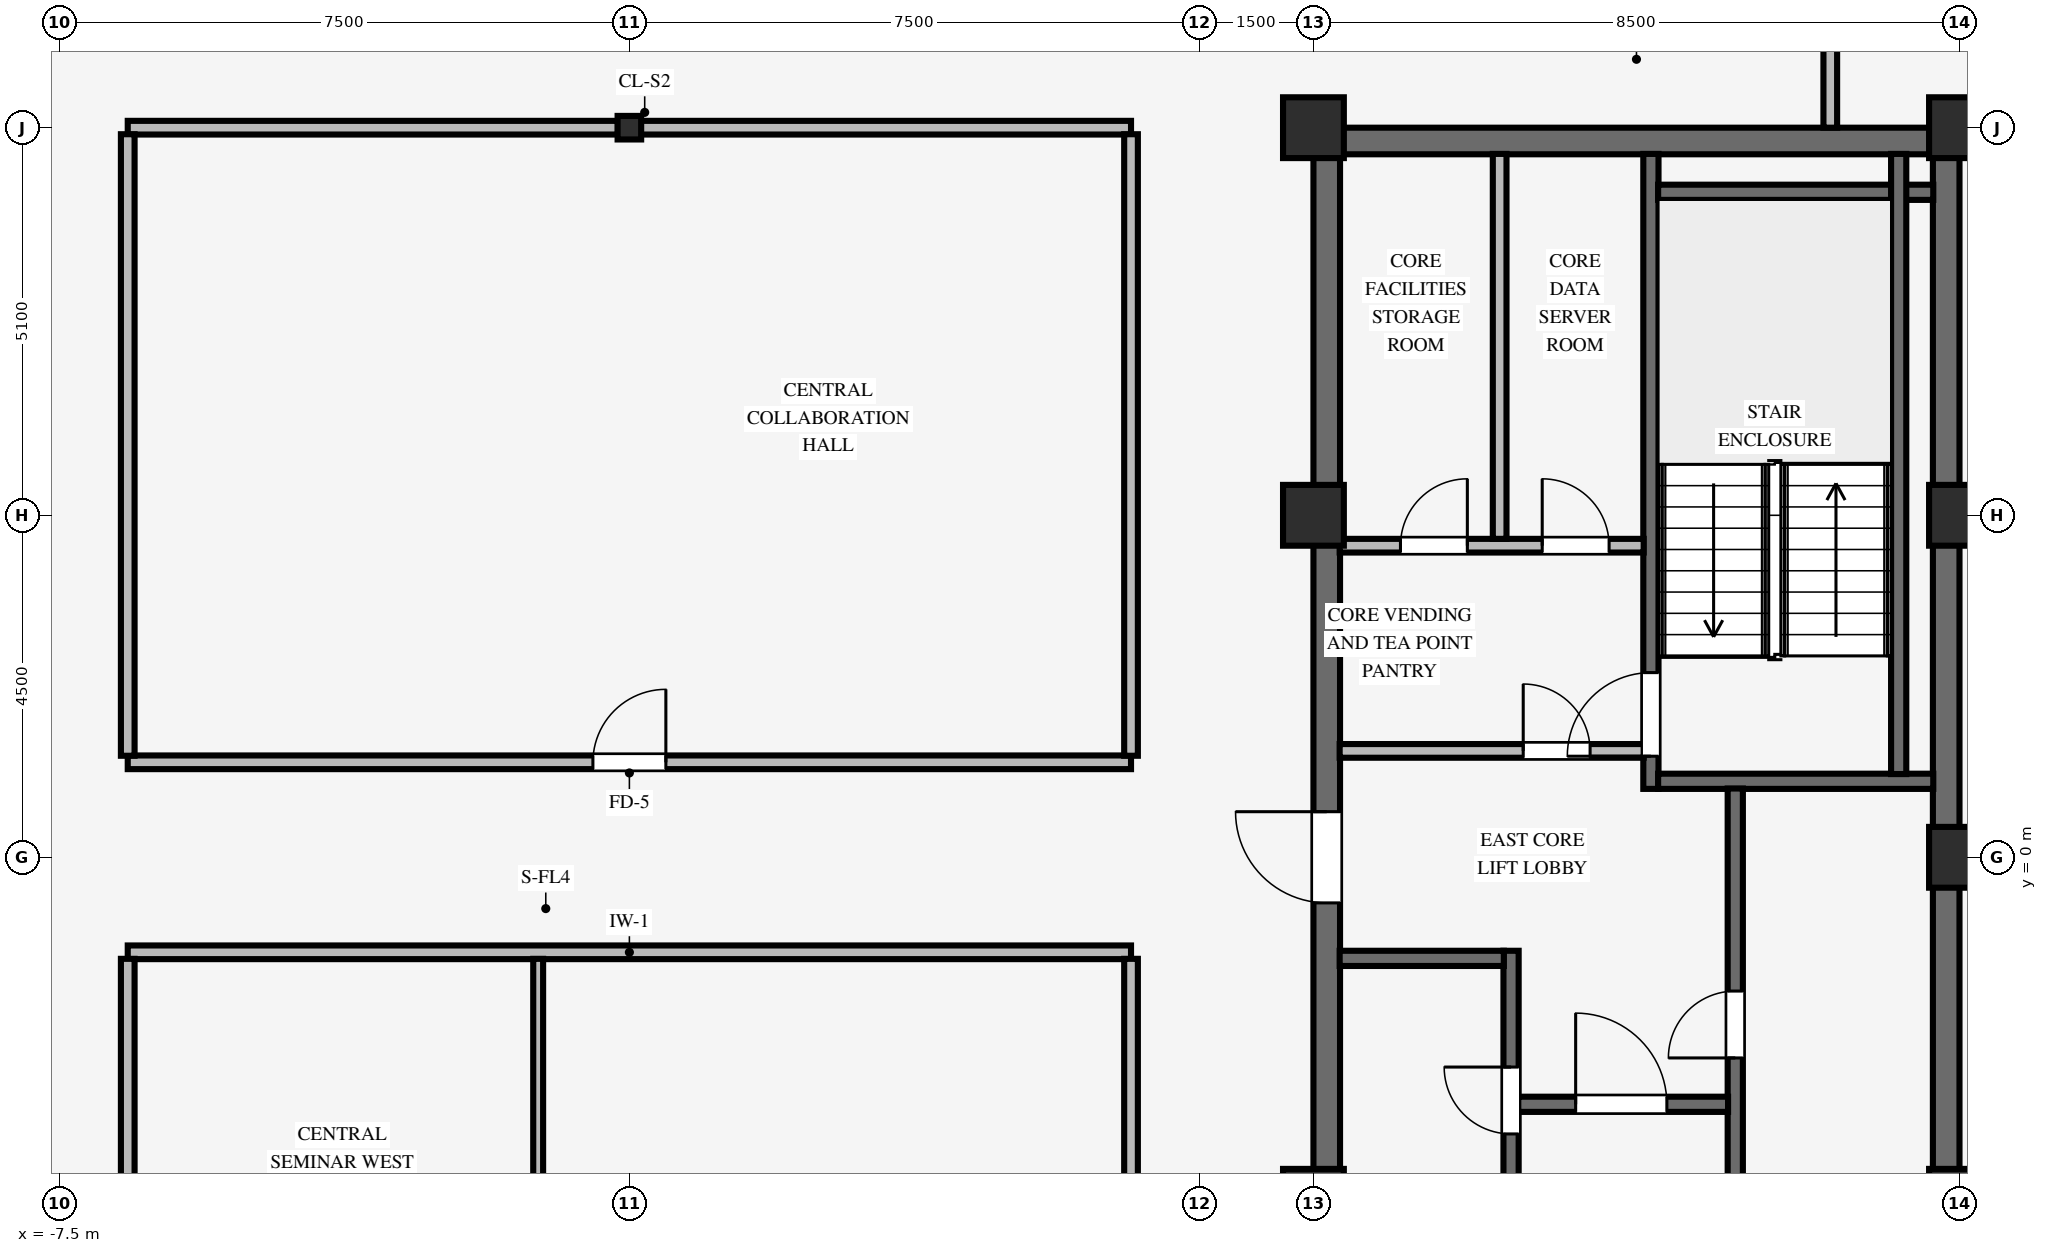
"""IFC4 building model, lengths in metres.
Left out: names, types, materials, properties, quantities, classifications, styles, units other than length and angle.
Written with IfcOpenShell. Run it as: python <this file> out.ifc"""

import sys

from ifc_helpers import new_model, si_unit, direction, frame, frame_2d, origin, origin_2d, place, context, subcontext, project, spatial, rectangle, i_section, extrude, source, transform, mapped, element, fill, save


model = new_model("IFC4")
c1 = context("Model", 3, precision=1e-05, world=origin(), true_north=direction((0.0, 1.0)))
c2 = subcontext(c1, "Body", "Model", "MODEL_VIEW")
j1 = project(units=[si_unit("LENGTHUNIT", "METRE"), si_unit("PLANEANGLEUNIT", "RADIAN")], contexts=[c1])
p1 = place(None, origin())
s1 = spatial("IfcSite", under=j1, at=p1, CompositionType="ELEMENT")
p2 = place(p1, origin())
s2 = spatial("IfcBuilding", under=s1, at=p2, CompositionType="ELEMENT")
p3 = place(p2, frame((0.0, 0.0, 257.95)))
s3 = spatial("IfcBuildingStorey", under=s2, at=p3, CompositionType="ELEMENT", Elevation=257.95)
p4 = place(p3, frame((9.0, 9.425, 0.0), z_axis=(0.0, 0.0, 1.0), x_axis=(1.0, 0.0, 0.0)))
e1 = element("IfcWall", 1, at=p4, inside=s3, PredefinedType="SHEAR", context=c2, shape_type="SweptSolid", body=[
    extrude(rectangle(XDim=8.5, YDim=0.35, at=frame_2d((4.25, 0.0))), origin(), (0.0, 0.0, 1.0), 3.37),
])
p5 = place(p3, frame((9.175, -9.255, 0.0), z_axis=(0.0, 0.0, 1.0), x_axis=(0.0, 1.0, 0.0)))
e2 = element("IfcWall", 2, at=p5, inside=s3, PredefinedType="SHEAR", context=c2, shape_type="SweptSolid", body=[
    extrude(rectangle(XDim=18.51, YDim=0.35, at=frame_2d((9.255, 0.0))), origin(), (0.0, 0.0, 1.0), 3.37),
])
p6 = place(p5, frame((8.655, 0.0, 0.0)))
e3 = element("IfcOpeningElement", 3, at=p6, cuts=e2, PredefinedType="OPENING", context=c2, shape_type="SweptSolid", body=[
    extrude(rectangle(XDim=1.2, YDim=2.15, at=frame_2d((0.6, 1.075))), frame((0.0, 0.185, 0.0), z_axis=(0.0, -1.0, 0.0), x_axis=(1.0, 0.0, 0.0)), (0.0, 0.0, 1.0), 0.37),
])
p7 = place(p3, frame((17.325, -9.255, 0.0), z_axis=(0.0, 0.0, 1.0), x_axis=(0.0, 1.0, 0.0)))
e4 = element("IfcWall", 4, at=p7, inside=s3, PredefinedType="SHEAR", context=c2, shape_type="SweptSolid", body=[
    extrude(rectangle(XDim=18.51, YDim=0.35, at=frame_2d((9.255, 0.0))), origin(), (0.0, 0.0, 1.0), 3.37),
])
for number, where, z_axis, x_axis in (
    (5, (9.0, -4.5, 0.0), (0.0, 0.0, 1.0), (1.0, 0.0, 0.0)),
    (6, (9.0, 4.5, 0.0), (0.0, 0.0, 1.0), (1.0, 0.0, 0.0)),
    (7, (9.0, 9.6, 0.0), (0.0, 0.0, 1.0), (1.0, 0.0, 0.0)),
    (8, (17.5, -4.5, 0.0), (0.0, 0.0, 1.0), (1.0, 0.0, 0.0)),
    (9, (17.5, 4.5, 0.0), (0.0, 0.0, 1.0), (1.0, 0.0, 0.0)),
    (10, (17.5, 9.6, 0.0), (0.0, 0.0, 1.0), (1.0, 0.0, 0.0)),
    (11, (17.5, 0.0, 0.0), (0.0, 0.0, 1.0), (1.0, 0.0, 0.0)),
):
    element("IfcColumn", number, at=place(p3, frame(where, z_axis=z_axis, x_axis=x_axis)), inside=s3, PredefinedType="COLUMN", context=c2, shape_type="SweptSolid", body=[
        extrude(rectangle(XDim=0.8, YDim=0.8, at=origin_2d()), origin(), (0.0, 0.0, 1.0), 3.37),
    ])
p8 = place(p3, frame((0.0, 9.6, 0.0), z_axis=(0.0, 0.0, 1.0), x_axis=(1.0, 0.0, 0.0)))
e12 = element("IfcColumn", 12, at=p8, inside=s3, PredefinedType="COLUMN", context=c2, shape_type="SweptSolid", body=[
    extrude(i_section(OverallWidth=0.31, OverallDepth=0.31, WebThickness=0.015, FlangeThickness=0.015, FilletRadius=0.015, at=origin_2d()), origin(), (0.0, 0.0, 1.0), 3.37),
])
p9 = place(p3, frame((13.44, 0.9, 0.0), z_axis=(0.0, 0.0, 1.0), x_axis=(0.0, 1.0, 0.0)))
e13 = element("IfcWall", 13, at=p9, inside=s3, PredefinedType="SHEAR", context=c2, shape_type="SweptSolid", body=[
    extrude(rectangle(XDim=8.355, YDim=0.2, at=frame_2d((4.177, 0.0))), origin(), (0.0, 0.0, 1.0), 3.37),
])
p10 = place(p9, frame((0.43, 0.0, 0.0)))
e14 = element("IfcOpeningElement", 14, at=p10, cuts=e13, PredefinedType="OPENING", context=c2, shape_type="SweptSolid", body=[
    extrude(rectangle(XDim=1.1, YDim=2.15, at=frame_2d((0.55, 1.075))), frame((0.0, 0.11, 0.0), z_axis=(0.0, -1.0, 0.0), x_axis=(1.0, 0.0, 0.0)), (0.0, 0.0, 1.0), 0.22),
])
for number, where, z_axis, x_axis in (
    (15, (13.535, 1.0, 0.0), (0.0, 0.0, 1.0), (1.0, 0.0, 0.0)),
    (16, (13.535, 8.75, 0.0), (0.0, 0.0, 1.0), (1.0, 0.0, 0.0)),
):
    element("IfcWall", number, at=place(p3, frame(where, z_axis=z_axis, x_axis=x_axis)), inside=s3, PredefinedType="SHEAR", context=c2, shape_type="SweptSolid", body=[
        extrude(rectangle(XDim=3.62, YDim=0.2, at=frame_2d((1.81, 0.0))), origin(), (0.0, 0.0, 1.0), 3.37),
    ])
p11 = place(p3, frame((16.7, 1.095, 0.0), z_axis=(0.0, 0.0, 1.0), x_axis=(0.0, 1.0, 0.0)))
e17 = element("IfcWall", 17, at=p11, inside=s3, PredefinedType="SHEAR", context=c2, shape_type="SweptSolid", body=[
    extrude(rectangle(XDim=8.16, YDim=0.2, at=frame_2d((4.08, 0.0))), origin(), (0.0, 0.0, 1.0), 3.37),
])
p12 = place(p3, frame((14.55, -9.255, 0.0), z_axis=(0.0, 0.0, 1.0), x_axis=(0.0, 1.0, 0.0)))
e18 = element("IfcWall", 18, at=p12, inside=s3, PredefinedType="SHEAR", context=c2, shape_type="SweptSolid", body=[
    extrude(rectangle(XDim=10.16, YDim=0.2, at=frame_2d((5.08, 0.0))), origin(), (0.0, 0.0, 1.0), 3.37),
])
p13 = place(p12, frame((6.615, 0.0, 0.0)))
e19 = element("IfcOpeningElement", 19, at=p13, cuts=e18, PredefinedType="OPENING", context=c2, shape_type="SweptSolid", body=[
    extrude(rectangle(XDim=0.88, YDim=2.1, at=frame_2d((0.44, 1.05))), frame((0.0, 0.11, 0.0), z_axis=(0.0, -1.0, 0.0), x_axis=(1.0, 0.0, 0.0)), (0.0, 0.0, 1.0), 0.22),
])
p14 = place(p12, frame((0.98, 0.0, 0.0)))
e20 = element("IfcOpeningElement", 20, at=p14, cuts=e18, PredefinedType="OPENING", context=c2, shape_type="SweptSolid", body=[
    extrude(rectangle(XDim=1.15, YDim=2.15, at=frame_2d((0.575, 1.075))), frame((0.0, 0.11, 0.0), z_axis=(0.0, -1.0, 0.0), x_axis=(1.0, 0.0, 0.0)), (0.0, 0.0, 1.0), 0.22),
])
p15 = place(p3, frame((11.6, -9.255, 0.0), z_axis=(0.0, 0.0, 1.0), x_axis=(0.0, 1.0, 0.0)))
e21 = element("IfcWall", 21, at=p15, inside=s3, PredefinedType="SHEAR", context=c2, shape_type="SweptSolid", body=[
    extrude(rectangle(XDim=8.025, YDim=0.2, at=frame_2d((4.012, 0.0))), origin(), (0.0, 0.0, 1.0), 3.37),
])
p16 = place(p15, frame((5.615, 0.0, 0.0)))
e22 = element("IfcOpeningElement", 22, at=p16, cuts=e21, PredefinedType="OPENING", context=c2, shape_type="SweptSolid", body=[
    extrude(rectangle(XDim=0.88, YDim=2.1, at=frame_2d((0.44, 1.05))), frame((0.0, 0.11, 0.0), z_axis=(0.0, -1.0, 0.0), x_axis=(1.0, 0.0, 0.0)), (0.0, 0.0, 1.0), 0.22),
])
p17 = place(p3, frame((11.695, -3.25, 0.0), z_axis=(0.0, 0.0, 1.0), x_axis=(1.0, 0.0, 0.0)))
e23 = element("IfcWall", 23, at=p17, inside=s3, PredefinedType="SHEAR", context=c2, shape_type="SweptSolid", body=[
    extrude(rectangle(XDim=2.76, YDim=0.2, at=frame_2d((1.38, 0.0))), origin(), (0.0, 0.0, 1.0), 3.37),
])
p18 = place(p17, frame((0.755, 0.0, 0.0)))
e24 = element("IfcOpeningElement", 24, at=p18, cuts=e23, PredefinedType="OPENING", context=c2, shape_type="SweptSolid", body=[
    extrude(rectangle(XDim=1.2, YDim=2.15, at=frame_2d((0.6, 1.075))), frame((0.0, 0.11, 0.0), z_axis=(0.0, -1.0, 0.0), x_axis=(1.0, 0.0, 0.0)), (0.0, 0.0, 1.0), 0.22),
])
p19 = place(p3, frame((9.345, -1.33, 0.0), z_axis=(0.0, 0.0, 1.0), x_axis=(1.0, 0.0, 0.0)))
e25 = element("IfcWall", 25, at=p19, inside=s3, PredefinedType="SHEAR", context=c2, shape_type="SweptSolid", body=[
    extrude(rectangle(XDim=2.16, YDim=0.2, at=frame_2d((1.08, 0.0))), origin(), (0.0, 0.0, 1.0), 3.37),
])
p20 = place(p3, frame((9.345, 1.4, 0.0), z_axis=(0.0, 0.0, 1.0), x_axis=(1.0, 0.0, 0.0)))
e26 = element("IfcWall", 26, at=p20, inside=s3, PredefinedType="PARTITIONING", context=c2, shape_type="SweptSolid", body=[
    extrude(rectangle(XDim=4.0, YDim=0.18, at=frame_2d((2.0, 0.0))), origin(), (0.0, 0.0, 1.0), 3.36),
])
p21 = place(p20, frame((2.415, 0.0, 0.0)))
e27 = element("IfcOpeningElement", 27, at=p21, cuts=e26, PredefinedType="OPENING", context=c2, shape_type="SweptSolid", body=[
    extrude(rectangle(XDim=0.88, YDim=2.1, at=frame_2d((0.44, 1.05))), frame((0.0, 0.1, 0.0), z_axis=(0.0, -1.0, 0.0), x_axis=(1.0, 0.0, 0.0)), (0.0, 0.0, 1.0), 0.2),
])
p22 = place(p3, frame((9.345, 4.1, 0.0), z_axis=(0.0, 0.0, 1.0), x_axis=(1.0, 0.0, 0.0)))
e28 = element("IfcWall", 28, at=p22, inside=s3, PredefinedType="PARTITIONING", context=c2, shape_type="SweptSolid", body=[
    extrude(rectangle(XDim=4.0, YDim=0.18, at=frame_2d((2.0, 0.0))), origin(), (0.0, 0.0, 1.0), 3.36),
])
p23 = place(p22, frame((0.8, 0.0, 0.0)))
e29 = element("IfcOpeningElement", 29, at=p23, cuts=e28, PredefinedType="OPENING", context=c2, shape_type="SweptSolid", body=[
    extrude(rectangle(XDim=0.88, YDim=2.1, at=frame_2d((0.44, 1.05))), frame((0.0, 0.1, 0.0), z_axis=(0.0, -1.0, 0.0), x_axis=(1.0, 0.0, 0.0)), (0.0, 0.0, 1.0), 0.2),
])
p24 = place(p22, frame((2.665, 0.0, 0.0)))
e30 = element("IfcOpeningElement", 30, at=p24, cuts=e28, PredefinedType="OPENING", context=c2, shape_type="SweptSolid", body=[
    extrude(rectangle(XDim=0.88, YDim=2.1, at=frame_2d((0.44, 1.05))), frame((0.0, 0.1, 0.0), z_axis=(0.0, -1.0, 0.0), x_axis=(1.0, 0.0, 0.0)), (0.0, 0.0, 1.0), 0.2),
])
p25 = place(p3, frame((11.45, 4.19, 0.0), z_axis=(0.0, 0.0, 1.0), x_axis=(0.0, 1.0, 0.0)))
e31 = element("IfcWall", 31, at=p25, inside=s3, PredefinedType="PARTITIONING", context=c2, shape_type="SweptSolid", body=[
    extrude(rectangle(XDim=5.065, YDim=0.18, at=frame_2d((2.532, 0.0))), origin(), (0.0, 0.0, 1.0), 3.36),
])
p26 = place(p3, frame((-6.6, -1.25, 0.0), z_axis=(0.0, 0.0, 1.0), x_axis=(1.0, 0.0, 0.0)))
e32 = element("IfcWall", 32, at=p26, inside=s3, PredefinedType="PARTITIONING", context=c2, shape_type="SweptSolid", body=[
    extrude(rectangle(XDim=13.2, YDim=0.18, at=frame_2d((6.6, 0.0))), origin(), (0.0, 0.0, 1.0), 3.36),
])
p27 = place(p3, frame((-6.6, 1.25, 0.0), z_axis=(0.0, 0.0, 1.0), x_axis=(1.0, 0.0, 0.0)))
e33 = element("IfcWall", 33, at=p27, inside=s3, PredefinedType="PARTITIONING", context=c2, shape_type="SweptSolid", body=[
    extrude(rectangle(XDim=13.2, YDim=0.18, at=frame_2d((6.6, 0.0))), origin(), (0.0, 0.0, 1.0), 3.36),
])
p28 = place(p27, frame((6.12, 0.0, 0.0)))
e34 = element("IfcOpeningElement", 34, at=p28, cuts=e33, PredefinedType="OPENING", context=c2, shape_type="SweptSolid", body=[
    extrude(rectangle(XDim=0.96, YDim=2.1, at=frame_2d((0.48, 1.05))), frame((0.0, 0.1, 0.0), z_axis=(0.0, -1.0, 0.0), x_axis=(1.0, 0.0, 0.0)), (0.0, 0.0, 1.0), 0.2),
])
for number, where, z_axis, x_axis in (
    (35, (-6.6, 9.6, 0.0), (0.0, 0.0, 1.0), (1.0, 0.0, 0.0)),
    (36, (0.151, 9.6, 0.0), (0.0, 0.0, 1.0), (1.0, 0.0, 0.0)),
):
    element("IfcWall", number, at=place(p3, frame(where, z_axis=z_axis, x_axis=x_axis)), inside=s3, PredefinedType="PARTITIONING", context=c2, shape_type="SweptSolid", body=[
        extrude(rectangle(XDim=6.449, YDim=0.18, at=frame_2d((3.225, 0.0))), origin(), (0.0, 0.0, 1.0), 2.405),
    ])
p29 = place(p3, frame((-6.6, -19.1, 0.0), z_axis=(0.0, 0.0, 1.0), x_axis=(0.0, 1.0, 0.0)))
e37 = element("IfcWall", 37, at=p29, inside=s3, PredefinedType="PARTITIONING", context=c2, shape_type="SweptSolid", body=[
    extrude(rectangle(XDim=17.764, YDim=0.18, at=frame_2d((8.882, 0.0))), origin(), (0.0, 0.0, 1.0), 3.36),
])
p30 = place(p29, frame((13.152, 0.0, 0.0)))
e38 = element("IfcOpeningElement", 38, at=p30, cuts=e37, PredefinedType="OPENING", context=c2, shape_type="SweptSolid", body=[
    extrude(rectangle(XDim=0.96, YDim=2.1, at=frame_2d((0.48, 1.05))), frame((0.0, 0.1, 0.0), z_axis=(0.0, -1.0, 0.0), x_axis=(1.0, 0.0, 0.0)), (0.0, 0.0, 1.0), 0.2),
])
p31 = place(p29, frame((4.82, 0.0, 0.0)))
e39 = element("IfcOpeningElement", 39, at=p31, cuts=e37, PredefinedType="OPENING", context=c2, shape_type="SweptSolid", body=[
    extrude(rectangle(XDim=0.96, YDim=2.1, at=frame_2d((0.48, 1.05))), frame((0.0, 0.1, 0.0), z_axis=(0.0, -1.0, 0.0), x_axis=(1.0, 0.0, 0.0)), (0.0, 0.0, 1.0), 0.2),
])
p32 = place(p3, frame((-6.6, 1.336, 0.0), z_axis=(0.0, 0.0, 1.0), x_axis=(0.0, 1.0, 0.0)))
e40 = element("IfcWall", 40, at=p32, inside=s3, PredefinedType="PARTITIONING", context=c2, shape_type="SweptSolid", body=[
    extrude(rectangle(XDim=8.178, YDim=0.18, at=frame_2d((4.089, 0.0))), origin(), (0.0, 0.0, 1.0), 3.36),
])
p33 = place(p3, frame((-1.2, -9.534, 0.0), z_axis=(0.0, 0.0, 1.0), x_axis=(0.0, 1.0, 0.0)))
e41 = element("IfcWall", 41, at=p33, inside=s3, PredefinedType="PARTITIONING", context=c2, shape_type="SweptSolid", body=[
    extrude(rectangle(XDim=8.198, YDim=0.13, at=frame_2d((4.099, 0.0))), origin(), (0.0, 0.0, 1.0), 3.36),
])
p34 = place(p3, frame((6.6, -19.1, 0.0), z_axis=(0.0, 0.0, 1.0), x_axis=(0.0, 1.0, 0.0)))
e42 = element("IfcWall", 42, at=p34, inside=s3, PredefinedType="PARTITIONING", context=c2, shape_type="SweptSolid", body=[
    extrude(rectangle(XDim=17.764, YDim=0.18, at=frame_2d((8.882, 0.0))), origin(), (0.0, 0.0, 1.0), 3.36),
])
p35 = place(p34, frame((13.152, 0.0, 0.0)))
e43 = element("IfcOpeningElement", 43, at=p35, cuts=e42, PredefinedType="OPENING", context=c2, shape_type="SweptSolid", body=[
    extrude(rectangle(XDim=0.96, YDim=2.1, at=frame_2d((0.48, 1.05))), frame((0.0, 0.1, 0.0), z_axis=(0.0, -1.0, 0.0), x_axis=(1.0, 0.0, 0.0)), (0.0, 0.0, 1.0), 0.2),
])
p36 = place(p34, frame((6.12, 0.0, 0.0)))
e44 = element("IfcOpeningElement", 44, at=p36, cuts=e42, PredefinedType="OPENING", context=c2, shape_type="SweptSolid", body=[
    extrude(rectangle(XDim=0.96, YDim=2.1, at=frame_2d((0.48, 1.05))), frame((0.0, 0.1, 0.0), z_axis=(0.0, -1.0, 0.0), x_axis=(1.0, 0.0, 0.0)), (0.0, 0.0, 1.0), 0.2),
])
p37 = place(p3, frame((6.6, 1.336, 0.0), z_axis=(0.0, 0.0, 1.0), x_axis=(0.0, 1.0, 0.0)))
e45 = element("IfcWall", 45, at=p37, inside=s3, PredefinedType="PARTITIONING", context=c2, shape_type="SweptSolid", body=[
    extrude(rectangle(XDim=8.178, YDim=0.18, at=frame_2d((4.089, 0.0))), origin(), (0.0, 0.0, 1.0), 3.36),
])
p38 = place(p3, frame((15.8, 9.6, 0.0), z_axis=(0.0, 0.0, 1.0), x_axis=(0.0, 1.0, 0.0)))
e46 = element("IfcWall", 46, at=p38, inside=s3, PredefinedType="PARTITIONING", context=c2, shape_type="SweptSolid", body=[
    extrude(rectangle(XDim=2.514, YDim=0.18, at=frame_2d((1.257, 0.0))), origin(), (0.0, 0.0, 1.0), 3.36),
])
m1 = source(origin(), c2, "Body", "SweptSolid", [
    extrude(rectangle(XDim=1.1, YDim=2.15, at=frame_2d((0.55, 1.075))), frame((0.0, 0.025, 0.0), z_axis=(0.0, -1.0, 0.0), x_axis=(1.0, 0.0, 0.0)), (0.0, 0.0, 1.0), 0.05),
])
p39 = place(p10, origin())
e47 = element("IfcDoor", 47, at=p39, inside=s3, OperationType="SINGLE_SWING_LEFT", PredefinedType="DOOR", context=c2, shape_type="MappedRepresentation", body=[
    mapped(m1, transform((0.0, 0.0, 0.0), scale=1.0)),
])
fill(e14, e47)
m2 = source(origin(), c2, "Body", "SweptSolid", [
    extrude(rectangle(XDim=0.88, YDim=2.1, at=frame_2d((0.44, 1.05))), frame((0.0, 0.025, 0.0), z_axis=(0.0, -1.0, 0.0), x_axis=(1.0, 0.0, 0.0)), (0.0, 0.0, 1.0), 0.05),
])
p40 = place(p13, origin())
e48 = element("IfcDoor", 48, at=p40, inside=s3, OperationType="SINGLE_SWING_LEFT", PredefinedType="DOOR", context=c2, shape_type="MappedRepresentation", body=[
    mapped(m2, transform((0.0, 0.0, 0.0), scale=1.0)),
])
fill(e19, e48)
m3 = source(origin(), c2, "Body", "SweptSolid", [
    extrude(rectangle(XDim=1.2, YDim=2.15, at=frame_2d((0.6, 1.075))), frame((0.0, 0.025, 0.0), z_axis=(0.0, -1.0, 0.0), x_axis=(1.0, 0.0, 0.0)), (0.0, 0.0, 1.0), 0.05),
])
p41 = place(p18, origin())
e49 = element("IfcDoor", 49, at=p41, inside=s3, OperationType="SINGLE_SWING_LEFT", PredefinedType="DOOR", context=c2, shape_type="MappedRepresentation", body=[
    mapped(m3, transform((0.0, 0.0, 0.0), scale=1.0)),
])
fill(e24, e49)
p42 = place(p16, origin())
e50 = element("IfcDoor", 50, at=p42, inside=s3, OperationType="SINGLE_SWING_RIGHT", PredefinedType="DOOR", context=c2, shape_type="MappedRepresentation", body=[
    mapped(m2, transform((0.0, 0.0, 0.0), scale=1.0)),
])
fill(e22, e50)
p43 = place(p6, origin())
e51 = element("IfcDoor", 51, at=p43, inside=s3, OperationType="SINGLE_SWING_RIGHT", PredefinedType="DOOR", context=c2, shape_type="MappedRepresentation", body=[
    mapped(m3, transform((0.0, 0.0, 0.0), scale=1.0)),
])
fill(e3, e51)
p44 = place(p21, origin())
e52 = element("IfcDoor", 52, at=p44, inside=s3, OperationType="SINGLE_SWING_LEFT", PredefinedType="DOOR", context=c2, shape_type="MappedRepresentation", body=[
    mapped(m2, transform((0.0, 0.0, 0.0), scale=1.0)),
])
fill(e27, e52)
p45 = place(p23, origin())
e53 = element("IfcDoor", 53, at=p45, inside=s3, OperationType="SINGLE_SWING_RIGHT", PredefinedType="DOOR", context=c2, shape_type="MappedRepresentation", body=[
    mapped(m2, transform((0.0, 0.0, 0.0), scale=1.0)),
])
fill(e29, e53)
p46 = place(p24, origin())
e54 = element("IfcDoor", 54, at=p46, inside=s3, OperationType="SINGLE_SWING_LEFT", PredefinedType="DOOR", context=c2, shape_type="MappedRepresentation", body=[
    mapped(m2, transform((0.0, 0.0, 0.0), scale=1.0)),
])
fill(e30, e54)
m4 = source(origin(), c2, "Body", "SweptSolid", [
    extrude(rectangle(XDim=0.96, YDim=2.1, at=frame_2d((0.48, 1.05))), frame((0.0, 0.025, 0.0), z_axis=(0.0, -1.0, 0.0), x_axis=(1.0, 0.0, 0.0)), (0.0, 0.0, 1.0), 0.05),
])
p47 = place(p28, origin())
e55 = element("IfcDoor", 55, at=p47, inside=s3, OperationType="SINGLE_SWING_RIGHT", PredefinedType="DOOR", context=c2, shape_type="MappedRepresentation", body=[
    mapped(m4, transform((0.0, 0.0, 0.0), scale=1.0)),
])
fill(e34, e55)
save(model, sys.argv[1])
